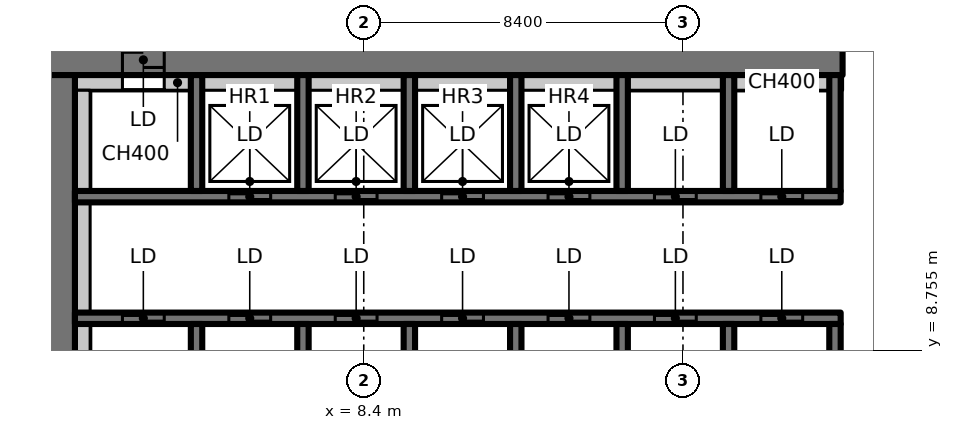
"""IFC4 building model, lengths in metres.
Left out: names, types, materials, properties, quantities, classifications, styles, units other than length and angle.
Written with IfcOpenShell. Run it as: python <this file> out.ifc"""

import sys

from ifc_helpers import new_model, si_unit, direction, frame, frame_2d, origin, place, context, subcontext, project, spatial, rectangle, extrude, element, fill, save


model = new_model("IFC4")
c1 = context("Model", 3, precision=1e-05, world=origin(), true_north=direction((0.0, 1.0)))
c2 = subcontext(c1, "Body", "Model", "MODEL_VIEW")
j1 = project(units=[si_unit("LENGTHUNIT", "METRE"), si_unit("PLANEANGLEUNIT", "RADIAN")], contexts=[c1])
p1 = place(None, origin())
s1 = spatial("IfcSite", under=j1, at=p1, CompositionType="ELEMENT")
p2 = place(p1, origin())
s2 = spatial("IfcBuilding", under=s1, at=p2, CompositionType="ELEMENT")
p3 = place(p2, frame((0.0, 0.0, 156.5)))
s3 = spatial("IfcBuildingStorey", under=s2, at=p3, CompositionType="ELEMENT", Elevation=156.5)
p4 = place(p3, frame((-1.1, 16.4, 0.0), z_axis=(0.0, 0.0, 1.0), x_axis=(1.0, 0.0, 0.0)))
e1 = element("IfcWall", 1, at=p4, inside=s3, PredefinedType="SHEAR", context=c2, shape_type="SweptSolid", body=[
    extrude(rectangle(XDim=22.1, YDim=0.8, at=frame_2d((11.05, 0.0))), origin(), (0.0, 0.0, 1.0), 5.2),
])
p5 = place(p4, frame((3.15, 0.0, 0.0)))
e2 = element("IfcOpeningElement", 2, at=p5, cuts=e1, PredefinedType="OPENING", context=c2, shape_type="SweptSolid", body=[
    extrude(rectangle(XDim=1.1, YDim=2.3, at=frame_2d((0.55, 1.15))), frame((0.0, 0.41, 0.0), z_axis=(0.0, -1.0, 0.0), x_axis=(1.0, 0.0, 0.0)), (0.0, 0.0, 1.0), 0.82),
])
p6 = place(p3, frame((0.4, 7.136, 0.0), z_axis=(0.0, 0.0, 1.0), x_axis=(0.0, 1.0, 0.0)))
e3 = element("IfcWall", 3, at=p6, inside=s3, PredefinedType="SHEAR", context=c2, shape_type="SweptSolid", body=[
    extrude(rectangle(XDim=8.864, YDim=0.8, at=frame_2d((4.432, 0.0))), origin(), (0.0, 0.0, 1.0), 5.2),
])
p7 = place(p3, frame((0.8, 15.8, 0.0), z_axis=(0.0, 0.0, 1.0), x_axis=(1.0, 0.0, 0.0)))
e4 = element("IfcWall", 4, at=p7, inside=s3, PredefinedType="PARTITIONING", context=c2, shape_type="SweptSolid", body=[
    extrude(rectangle(XDim=1.25, YDim=0.4, at=frame_2d((0.625, 0.0))), origin(), (0.0, 0.0, 1.0), 5.2),
])
p8 = place(p3, frame((0.8, 9.6, 0.0), z_axis=(0.0, 0.0, 1.0), x_axis=(1.0, 0.0, 0.0)))
e5 = element("IfcWall", 5, at=p8, inside=s3, PredefinedType="SHEAR", context=c2, shape_type="SweptSolid", body=[
    extrude(rectangle(XDim=20.15, YDim=0.3, at=frame_2d((10.075, 0.0))), origin(), (0.0, 0.0, 1.0), 5.2),
])
p9 = place(p8, frame((1.25, 0.0, 0.0)))
e6 = element("IfcOpeningElement", 6, at=p9, cuts=e5, PredefinedType="OPENING", context=c2, shape_type="SweptSolid", body=[
    extrude(rectangle(XDim=1.1, YDim=2.3, at=frame_2d((0.55, 1.15))), frame((0.0, 0.16, 0.0), z_axis=(0.0, -1.0, 0.0), x_axis=(1.0, 0.0, 0.0)), (0.0, 0.0, 1.0), 0.32),
])
p10 = place(p8, frame((4.05, 0.0, 0.0)))
e7 = element("IfcOpeningElement", 7, at=p10, cuts=e5, PredefinedType="OPENING", context=c2, shape_type="SweptSolid", body=[
    extrude(rectangle(XDim=1.1, YDim=2.3, at=frame_2d((0.55, 1.15))), frame((0.0, 0.16, 0.0), z_axis=(0.0, -1.0, 0.0), x_axis=(1.0, 0.0, 0.0)), (0.0, 0.0, 1.0), 0.32),
])
p11 = place(p8, frame((6.85, 0.0, 0.0)))
e8 = element("IfcOpeningElement", 8, at=p11, cuts=e5, PredefinedType="OPENING", context=c2, shape_type="SweptSolid", body=[
    extrude(rectangle(XDim=1.1, YDim=2.3, at=frame_2d((0.55, 1.15))), frame((0.0, 0.16, 0.0), z_axis=(0.0, -1.0, 0.0), x_axis=(1.0, 0.0, 0.0)), (0.0, 0.0, 1.0), 0.32),
])
p12 = place(p8, frame((9.65, 0.0, 0.0)))
e9 = element("IfcOpeningElement", 9, at=p12, cuts=e5, PredefinedType="OPENING", context=c2, shape_type="SweptSolid", body=[
    extrude(rectangle(XDim=1.1, YDim=2.3, at=frame_2d((0.55, 1.15))), frame((0.0, 0.16, 0.0), z_axis=(0.0, -1.0, 0.0), x_axis=(1.0, 0.0, 0.0)), (0.0, 0.0, 1.0), 0.32),
])
p13 = place(p8, frame((12.45, 0.0, 0.0)))
e10 = element("IfcOpeningElement", 10, at=p13, cuts=e5, PredefinedType="OPENING", context=c2, shape_type="SweptSolid", body=[
    extrude(rectangle(XDim=1.1, YDim=2.3, at=frame_2d((0.55, 1.15))), frame((0.0, 0.16, 0.0), z_axis=(0.0, -1.0, 0.0), x_axis=(1.0, 0.0, 0.0)), (0.0, 0.0, 1.0), 0.32),
])
p14 = place(p8, frame((15.25, 0.0, 0.0)))
e11 = element("IfcOpeningElement", 11, at=p14, cuts=e5, PredefinedType="OPENING", context=c2, shape_type="SweptSolid", body=[
    extrude(rectangle(XDim=1.1, YDim=2.3, at=frame_2d((0.55, 1.15))), frame((0.0, 0.16, 0.0), z_axis=(0.0, -1.0, 0.0), x_axis=(1.0, 0.0, 0.0)), (0.0, 0.0, 1.0), 0.32),
])
p15 = place(p8, frame((18.05, 0.0, 0.0)))
e12 = element("IfcOpeningElement", 12, at=p15, cuts=e5, PredefinedType="OPENING", context=c2, shape_type="SweptSolid", body=[
    extrude(rectangle(XDim=1.1, YDim=2.3, at=frame_2d((0.55, 1.15))), frame((0.0, 0.16, 0.0), z_axis=(0.0, -1.0, 0.0), x_axis=(1.0, 0.0, 0.0)), (0.0, 0.0, 1.0), 0.32),
])
for number, where, z_axis, x_axis in (
    (13, (4.0, 7.15, 0.0), (0.0, 0.0, 1.0), (0.0, 1.0, 0.0)),
    (14, (6.8, 7.15, 0.0), (0.0, 0.0, 1.0), (0.0, 1.0, 0.0)),
    (15, (9.6, 7.15, 0.0), (0.0, 0.0, 1.0), (0.0, 1.0, 0.0)),
    (16, (12.4, 7.15, 0.0), (0.0, 0.0, 1.0), (0.0, 1.0, 0.0)),
    (17, (15.2, 7.15, 0.0), (0.0, 0.0, 1.0), (0.0, 1.0, 0.0)),
    (18, (18.0, 7.15, 0.0), (0.0, 0.0, 1.0), (0.0, 1.0, 0.0)),
    (19, (20.8, 7.15, 0.0), (0.0, 0.0, 1.0), (0.0, 1.0, 0.0)),
):
    element("IfcWall", number, at=place(p3, frame(where, z_axis=z_axis, x_axis=x_axis)), inside=s3, PredefinedType="SHEAR", context=c2, shape_type="SweptSolid", body=[
        extrude(rectangle(XDim=2.3, YDim=0.3, at=frame_2d((1.15, 0.0))), origin(), (0.0, 0.0, 1.0), 5.2),
    ])
p16 = place(p3, frame((0.8, 12.8, 0.0), z_axis=(0.0, 0.0, 1.0), x_axis=(1.0, 0.0, 0.0)))
e20 = element("IfcWall", 20, at=p16, inside=s3, PredefinedType="SHEAR", context=c2, shape_type="SweptSolid", body=[
    extrude(rectangle(XDim=20.15, YDim=0.3, at=frame_2d((10.075, 0.0))), origin(), (0.0, 0.0, 1.0), 5.2),
])
p17 = place(p16, frame((4.05, 0.0, 0.0)))
e21 = element("IfcOpeningElement", 21, at=p17, cuts=e20, PredefinedType="OPENING", context=c2, shape_type="SweptSolid", body=[
    extrude(rectangle(XDim=1.1, YDim=2.3, at=frame_2d((0.55, 1.15))), frame((0.0, 0.16, 0.0), z_axis=(0.0, -1.0, 0.0), x_axis=(1.0, 0.0, 0.0)), (0.0, 0.0, 1.0), 0.32),
])
p18 = place(p16, frame((6.85, 0.0, 0.0)))
e22 = element("IfcOpeningElement", 22, at=p18, cuts=e20, PredefinedType="OPENING", context=c2, shape_type="SweptSolid", body=[
    extrude(rectangle(XDim=1.1, YDim=2.3, at=frame_2d((0.55, 1.15))), frame((0.0, 0.16, 0.0), z_axis=(0.0, -1.0, 0.0), x_axis=(1.0, 0.0, 0.0)), (0.0, 0.0, 1.0), 0.32),
])
p19 = place(p16, frame((9.65, 0.0, 0.0)))
e23 = element("IfcOpeningElement", 23, at=p19, cuts=e20, PredefinedType="OPENING", context=c2, shape_type="SweptSolid", body=[
    extrude(rectangle(XDim=1.1, YDim=2.3, at=frame_2d((0.55, 1.15))), frame((0.0, 0.16, 0.0), z_axis=(0.0, -1.0, 0.0), x_axis=(1.0, 0.0, 0.0)), (0.0, 0.0, 1.0), 0.32),
])
p20 = place(p16, frame((12.45, 0.0, 0.0)))
e24 = element("IfcOpeningElement", 24, at=p20, cuts=e20, PredefinedType="OPENING", context=c2, shape_type="SweptSolid", body=[
    extrude(rectangle(XDim=1.1, YDim=2.3, at=frame_2d((0.55, 1.15))), frame((0.0, 0.16, 0.0), z_axis=(0.0, -1.0, 0.0), x_axis=(1.0, 0.0, 0.0)), (0.0, 0.0, 1.0), 0.32),
])
p21 = place(p16, frame((15.25, 0.0, 0.0)))
e25 = element("IfcOpeningElement", 25, at=p21, cuts=e20, PredefinedType="OPENING", context=c2, shape_type="SweptSolid", body=[
    extrude(rectangle(XDim=1.1, YDim=2.3, at=frame_2d((0.55, 1.15))), frame((0.0, 0.16, 0.0), z_axis=(0.0, -1.0, 0.0), x_axis=(1.0, 0.0, 0.0)), (0.0, 0.0, 1.0), 0.32),
])
p22 = place(p16, frame((18.05, 0.0, 0.0)))
e26 = element("IfcOpeningElement", 26, at=p22, cuts=e20, PredefinedType="OPENING", context=c2, shape_type="SweptSolid", body=[
    extrude(rectangle(XDim=1.1, YDim=2.3, at=frame_2d((0.55, 1.15))), frame((0.0, 0.16, 0.0), z_axis=(0.0, -1.0, 0.0), x_axis=(1.0, 0.0, 0.0)), (0.0, 0.0, 1.0), 0.32),
])
for number, where, z_axis, x_axis in (
    (27, (4.0, 12.95, 0.0), (0.0, 0.0, 1.0), (0.0, 1.0, 0.0)),
    (28, (6.8, 12.95, 0.0), (0.0, 0.0, 1.0), (0.0, 1.0, 0.0)),
    (29, (9.6, 12.95, 0.0), (0.0, 0.0, 1.0), (0.0, 1.0, 0.0)),
    (30, (12.4, 12.95, 0.0), (0.0, 0.0, 1.0), (0.0, 1.0, 0.0)),
    (31, (15.2, 12.95, 0.0), (0.0, 0.0, 1.0), (0.0, 1.0, 0.0)),
    (32, (18.0, 12.95, 0.0), (0.0, 0.0, 1.0), (0.0, 1.0, 0.0)),
    (33, (20.8, 12.95, 0.0), (0.0, 0.0, 1.0), (0.0, 1.0, 0.0)),
):
    element("IfcWall", number, at=place(p3, frame(where, z_axis=z_axis, x_axis=x_axis)), inside=s3, PredefinedType="SHEAR", context=c2, shape_type="SweptSolid", body=[
        extrude(rectangle(XDim=3.05, YDim=0.3, at=frame_2d((1.525, 0.0))), origin(), (0.0, 0.0, 1.0), 5.2),
    ])
p23 = place(p3, frame((1.0, 7.15, 0.0), z_axis=(0.0, 0.0, 1.0), x_axis=(0.0, 1.0, 0.0)))
e34 = element("IfcWall", 34, at=p23, inside=s3, PredefinedType="PARTITIONING", context=c2, shape_type="SweptSolid", body=[
    extrude(rectangle(XDim=2.3, YDim=0.4, at=frame_2d((1.15, 0.0))), origin(), (0.0, 0.0, 1.0), 5.2),
])
p24 = place(p3, frame((1.0, 9.75, 0.0), z_axis=(0.0, 0.0, 1.0), x_axis=(0.0, 1.0, 0.0)))
e35 = element("IfcWall", 35, at=p24, inside=s3, PredefinedType="PARTITIONING", context=c2, shape_type="SweptSolid", body=[
    extrude(rectangle(XDim=2.9, YDim=0.4, at=frame_2d((1.45, 0.0))), origin(), (0.0, 0.0, 1.0), 5.2),
])
p25 = place(p3, frame((1.0, 12.95, 0.0), z_axis=(0.0, 0.0, 1.0), x_axis=(0.0, 1.0, 0.0)))
e36 = element("IfcWall", 36, at=p25, inside=s3, PredefinedType="PARTITIONING", context=c2, shape_type="SweptSolid", body=[
    extrude(rectangle(XDim=2.65, YDim=0.4, at=frame_2d((1.325, 0.0))), origin(), (0.0, 0.0, 1.0), 5.2),
])
p26 = place(p3, frame((3.15, 15.8, 0.0), z_axis=(0.0, 0.0, 1.0), x_axis=(1.0, 0.0, 0.0)))
e37 = element("IfcWall", 37, at=p26, inside=s3, PredefinedType="PARTITIONING", context=c2, shape_type="SweptSolid", body=[
    extrude(rectangle(XDim=0.7, YDim=0.4, at=frame_2d((0.35, 0.0))), origin(), (0.0, 0.0, 1.0), 5.2),
])
for number, where, z_axis, x_axis in (
    (38, (4.15, 15.8, 0.0), (0.0, 0.0, 1.0), (1.0, 0.0, 0.0)),
    (39, (6.95, 15.8, 0.0), (0.0, 0.0, 1.0), (1.0, 0.0, 0.0)),
    (40, (9.75, 15.8, 0.0), (0.0, 0.0, 1.0), (1.0, 0.0, 0.0)),
    (41, (12.55, 15.8, 0.0), (0.0, 0.0, 1.0), (1.0, 0.0, 0.0)),
    (42, (15.35, 15.8, 0.0), (0.0, 0.0, 1.0), (1.0, 0.0, 0.0)),
    (43, (18.15, 15.8, 0.0), (0.0, 0.0, 1.0), (1.0, 0.0, 0.0)),
):
    element("IfcWall", number, at=place(p3, frame(where, z_axis=z_axis, x_axis=x_axis)), inside=s3, PredefinedType="PARTITIONING", context=c2, shape_type="SweptSolid", body=[
        extrude(rectangle(XDim=2.5, YDim=0.4, at=frame_2d((1.25, 0.0))), origin(), (0.0, 0.0, 1.0), 5.2),
    ])
p27 = place(p3, frame((20.95, 15.8, 0.0), z_axis=(0.0, 0.0, 1.0), x_axis=(1.0, 0.0, 0.0)))
e44 = element("IfcWall", 44, at=p27, inside=s3, PredefinedType="PARTITIONING", context=c2, shape_type="SweptSolid", body=[
    extrude(rectangle(XDim=0.05, YDim=0.4, at=frame_2d((0.025, 0.0))), origin(), (0.0, 0.0, 1.0), 5.2),
])
p28 = place(p9, origin())
e45 = element("IfcDoor", 45, at=p28, inside=s3, OperationType="SLIDING_TO_LEFT", PredefinedType="DOOR", context=c2, shape_type="SweptSolid", body=[
    extrude(rectangle(XDim=1.1, YDim=2.3, at=frame_2d((0.55, 1.15))), frame((0.0, 0.025, 0.0), z_axis=(0.0, -1.0, 0.0), x_axis=(1.0, 0.0, 0.0)), (0.0, 0.0, 1.0), 0.05),
])
fill(e6, e45)
p29 = place(p10, origin())
e46 = element("IfcDoor", 46, at=p29, inside=s3, OperationType="SLIDING_TO_LEFT", PredefinedType="DOOR", context=c2, shape_type="SweptSolid", body=[
    extrude(rectangle(XDim=1.1, YDim=2.3, at=frame_2d((0.55, 1.15))), frame((0.0, 0.025, 0.0), z_axis=(0.0, -1.0, 0.0), x_axis=(1.0, 0.0, 0.0)), (0.0, 0.0, 1.0), 0.05),
])
fill(e7, e46)
p30 = place(p11, origin())
e47 = element("IfcDoor", 47, at=p30, inside=s3, OperationType="SLIDING_TO_LEFT", PredefinedType="DOOR", context=c2, shape_type="SweptSolid", body=[
    extrude(rectangle(XDim=1.1, YDim=2.3, at=frame_2d((0.55, 1.15))), frame((0.0, 0.025, 0.0), z_axis=(0.0, -1.0, 0.0), x_axis=(1.0, 0.0, 0.0)), (0.0, 0.0, 1.0), 0.05),
])
fill(e8, e47)
p31 = place(p12, origin())
e48 = element("IfcDoor", 48, at=p31, inside=s3, OperationType="SLIDING_TO_LEFT", PredefinedType="DOOR", context=c2, shape_type="SweptSolid", body=[
    extrude(rectangle(XDim=1.1, YDim=2.3, at=frame_2d((0.55, 1.15))), frame((0.0, 0.025, 0.0), z_axis=(0.0, -1.0, 0.0), x_axis=(1.0, 0.0, 0.0)), (0.0, 0.0, 1.0), 0.05),
])
fill(e9, e48)
p32 = place(p13, origin())
e49 = element("IfcDoor", 49, at=p32, inside=s3, OperationType="SLIDING_TO_LEFT", PredefinedType="DOOR", context=c2, shape_type="SweptSolid", body=[
    extrude(rectangle(XDim=1.1, YDim=2.3, at=frame_2d((0.55, 1.15))), frame((0.0, 0.025, 0.0), z_axis=(0.0, -1.0, 0.0), x_axis=(1.0, 0.0, 0.0)), (0.0, 0.0, 1.0), 0.05),
])
fill(e10, e49)
p33 = place(p14, origin())
e50 = element("IfcDoor", 50, at=p33, inside=s3, OperationType="SLIDING_TO_LEFT", PredefinedType="DOOR", context=c2, shape_type="SweptSolid", body=[
    extrude(rectangle(XDim=1.1, YDim=2.3, at=frame_2d((0.55, 1.15))), frame((0.0, 0.025, 0.0), z_axis=(0.0, -1.0, 0.0), x_axis=(1.0, 0.0, 0.0)), (0.0, 0.0, 1.0), 0.05),
])
fill(e11, e50)
p34 = place(p15, origin())
e51 = element("IfcDoor", 51, at=p34, inside=s3, OperationType="SLIDING_TO_LEFT", PredefinedType="DOOR", context=c2, shape_type="SweptSolid", body=[
    extrude(rectangle(XDim=1.1, YDim=2.3, at=frame_2d((0.55, 1.15))), frame((0.0, 0.025, 0.0), z_axis=(0.0, -1.0, 0.0), x_axis=(1.0, 0.0, 0.0)), (0.0, 0.0, 1.0), 0.05),
])
fill(e12, e51)
p35 = place(p5, origin())
e52 = element("IfcDoor", 52, at=p35, inside=s3, OperationType="SLIDING_TO_LEFT", PredefinedType="DOOR", context=c2, shape_type="SweptSolid", body=[
    extrude(rectangle(XDim=1.1, YDim=2.3, at=frame_2d((0.55, 1.15))), frame((0.0, 0.025, 0.0), z_axis=(0.0, -1.0, 0.0), x_axis=(1.0, 0.0, 0.0)), (0.0, 0.0, 1.0), 0.05),
])
fill(e2, e52)
p36 = place(p17, origin())
e53 = element("IfcDoor", 53, at=p36, inside=s3, OperationType="SLIDING_TO_LEFT", PredefinedType="DOOR", context=c2, shape_type="SweptSolid", body=[
    extrude(rectangle(XDim=1.1, YDim=2.3, at=frame_2d((0.55, 1.15))), frame((0.0, 0.025, 0.0), z_axis=(0.0, -1.0, 0.0), x_axis=(1.0, 0.0, 0.0)), (0.0, 0.0, 1.0), 0.05),
])
fill(e21, e53)
p37 = place(p18, origin())
e54 = element("IfcDoor", 54, at=p37, inside=s3, OperationType="SLIDING_TO_LEFT", PredefinedType="DOOR", context=c2, shape_type="SweptSolid", body=[
    extrude(rectangle(XDim=1.1, YDim=2.3, at=frame_2d((0.55, 1.15))), frame((0.0, 0.025, 0.0), z_axis=(0.0, -1.0, 0.0), x_axis=(1.0, 0.0, 0.0)), (0.0, 0.0, 1.0), 0.05),
])
fill(e22, e54)
p38 = place(p19, origin())
e55 = element("IfcDoor", 55, at=p38, inside=s3, OperationType="SLIDING_TO_LEFT", PredefinedType="DOOR", context=c2, shape_type="SweptSolid", body=[
    extrude(rectangle(XDim=1.1, YDim=2.3, at=frame_2d((0.55, 1.15))), frame((0.0, 0.025, 0.0), z_axis=(0.0, -1.0, 0.0), x_axis=(1.0, 0.0, 0.0)), (0.0, 0.0, 1.0), 0.05),
])
fill(e23, e55)
p39 = place(p20, origin())
e56 = element("IfcDoor", 56, at=p39, inside=s3, OperationType="SLIDING_TO_LEFT", PredefinedType="DOOR", context=c2, shape_type="SweptSolid", body=[
    extrude(rectangle(XDim=1.1, YDim=2.3, at=frame_2d((0.55, 1.15))), frame((0.0, 0.025, 0.0), z_axis=(0.0, -1.0, 0.0), x_axis=(1.0, 0.0, 0.0)), (0.0, 0.0, 1.0), 0.05),
])
fill(e24, e56)
p40 = place(p21, origin())
e57 = element("IfcDoor", 57, at=p40, inside=s3, OperationType="SLIDING_TO_LEFT", PredefinedType="DOOR", context=c2, shape_type="SweptSolid", body=[
    extrude(rectangle(XDim=1.1, YDim=2.3, at=frame_2d((0.55, 1.15))), frame((0.0, 0.025, 0.0), z_axis=(0.0, -1.0, 0.0), x_axis=(1.0, 0.0, 0.0)), (0.0, 0.0, 1.0), 0.05),
])
fill(e25, e57)
p41 = place(p22, origin())
e58 = element("IfcDoor", 58, at=p41, inside=s3, OperationType="SLIDING_TO_LEFT", PredefinedType="DOOR", context=c2, shape_type="SweptSolid", body=[
    extrude(rectangle(XDim=1.1, YDim=2.3, at=frame_2d((0.55, 1.15))), frame((0.0, 0.025, 0.0), z_axis=(0.0, -1.0, 0.0), x_axis=(1.0, 0.0, 0.0)), (0.0, 0.0, 1.0), 0.05),
])
fill(e26, e58)
save(model, sys.argv[1])
